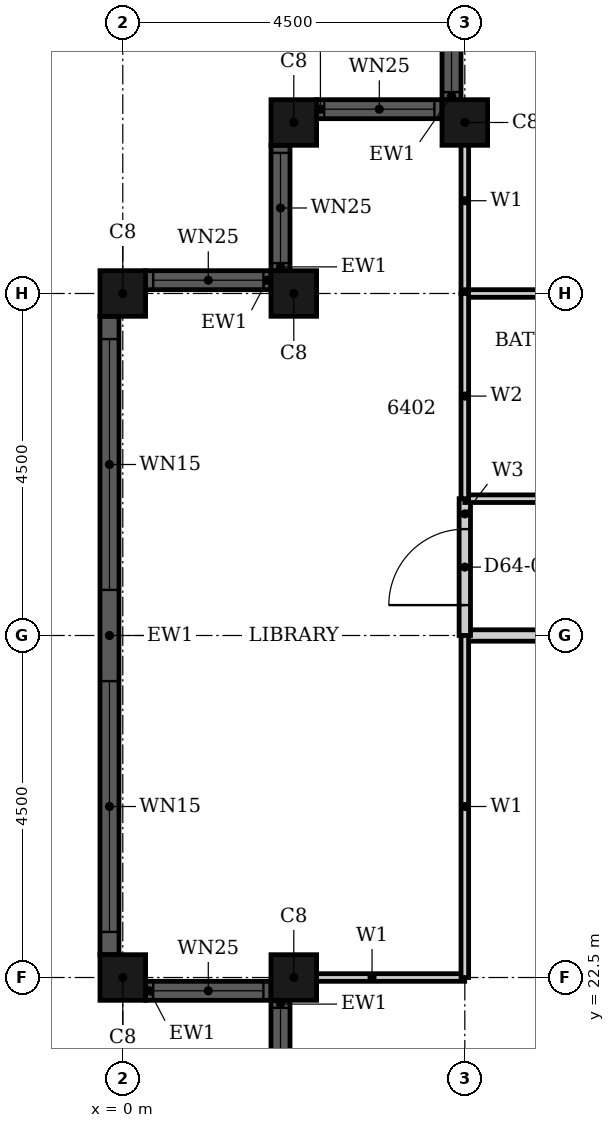
"""IFC4 building model, lengths in metres.
Left out: names, types, materials, properties, quantities, classifications, styles, units other than length and angle.
Written with IfcOpenShell. Run it as: python <this file> out.ifc"""

import sys

from ifc_helpers import new_model, si_unit, direction, frame, frame_2d, origin, origin_2d, place, context, subcontext, project, spatial, rectangle, hollow_rectangle, extrude, element, fill, save


model = new_model("IFC4")
c1 = context("Model", 3, precision=1e-05, world=origin(), true_north=direction((0.0, 1.0)))
c2 = subcontext(c1, "Body", "Model", "MODEL_VIEW")
j1 = project(units=[si_unit("LENGTHUNIT", "METRE"), si_unit("PLANEANGLEUNIT", "RADIAN")], contexts=[c1])
p1 = place(None, origin())
s1 = spatial("IfcSite", under=j1, at=p1, CompositionType="ELEMENT")
p2 = place(p1, origin())
s2 = spatial("IfcBuilding", under=s1, at=p2, CompositionType="ELEMENT")
p3 = place(p2, frame((0.0, 0.0, 252.7)))
s3 = spatial("IfcBuildingStorey", under=s2, at=p3, CompositionType="ELEMENT", Elevation=252.7)
for number, where, z_axis, x_axis in (
    (1, (4.5, 33.75, 0.0), (0.0, 0.0, 1.0), (1.0, 0.0, 0.0)),
    (2, (2.25, 33.75, 0.0), (0.0, 0.0, 1.0), (1.0, 0.0, 0.0)),
    (3, (2.25, 31.5, 0.0), (0.0, 0.0, 1.0), (1.0, 0.0, 0.0)),
    (4, (0.0, 31.5, 0.0), (0.0, 0.0, 1.0), (1.0, 0.0, 0.0)),
    (5, (0.0, 22.5, 0.0), (0.0, 0.0, 1.0), (1.0, 0.0, 0.0)),
    (6, (2.25, 22.5, 0.0), (0.0, 0.0, 1.0), (1.0, 0.0, 0.0)),
):
    element("IfcColumn", number, at=place(p3, frame(where, z_axis=z_axis, x_axis=x_axis)), inside=s3, PredefinedType="COLUMN", context=c2, shape_type="SweptSolid", body=[
        extrude(hollow_rectangle(XDim=0.6, YDim=0.6, WallThickness=0.02, at=origin_2d()), origin(), (0.0, 0.0, 1.0), 3.7),
    ])
p4 = place(p3, frame((4.325, 35.7, 0.0), z_axis=(0.0, 0.0, 1.0), x_axis=(0.0, -1.0, 0.0)))
e7 = element("IfcWall", 7, at=p4, inside=s3, PredefinedType="SOLIDWALL", context=c2, shape_type="SweptSolid", body=[
    extrude(rectangle(XDim=1.65, YDim=0.25, at=frame_2d((0.825, 0.0))), origin(), (0.0, 0.0, 1.0), 3.7),
])
p5 = place(p4, frame((0.1, 0.0, 0.9)))
e8 = element("IfcOpeningElement", 8, at=p5, cuts=e7, PredefinedType="OPENING", context=c2, shape_type="SweptSolid", body=[
    extrude(rectangle(XDim=1.45, YDim=1.85, at=frame_2d((0.725, 0.925))), frame((0.0, 0.135, 0.0), z_axis=(0.0, -1.0, 0.0), x_axis=(1.0, 0.0, 0.0)), (0.0, 0.0, 1.0), 0.27),
])
p6 = place(p3, frame((4.2, 33.925, 0.0), z_axis=(0.0, 0.0, 1.0), x_axis=(-1.0, 0.0, 0.0)))
e9 = element("IfcWall", 9, at=p6, inside=s3, PredefinedType="SOLIDWALL", context=c2, shape_type="SweptSolid", body=[
    extrude(rectangle(XDim=1.65, YDim=0.25, at=frame_2d((0.825, 0.0))), origin(), (0.0, 0.0, 1.0), 3.7),
])
p7 = place(p6, frame((0.1, 0.0, 0.9)))
e10 = element("IfcOpeningElement", 10, at=p7, cuts=e9, PredefinedType="OPENING", context=c2, shape_type="SweptSolid", body=[
    extrude(rectangle(XDim=1.45, YDim=1.85, at=frame_2d((0.725, 0.925))), frame((0.0, 0.135, 0.0), z_axis=(0.0, -1.0, 0.0), x_axis=(1.0, 0.0, 0.0)), (0.0, 0.0, 1.0), 0.27),
])
p8 = place(p3, frame((2.075, 33.45, 0.0), z_axis=(0.0, 0.0, 1.0), x_axis=(0.0, -1.0, 0.0)))
e11 = element("IfcWall", 11, at=p8, inside=s3, PredefinedType="SOLIDWALL", context=c2, shape_type="SweptSolid", body=[
    extrude(rectangle(XDim=1.65, YDim=0.25, at=frame_2d((0.825, 0.0))), origin(), (0.0, 0.0, 1.0), 3.7),
])
p9 = place(p8, frame((0.1, 0.0, 0.9)))
e12 = element("IfcOpeningElement", 12, at=p9, cuts=e11, PredefinedType="OPENING", context=c2, shape_type="SweptSolid", body=[
    extrude(rectangle(XDim=1.45, YDim=1.85, at=frame_2d((0.725, 0.925))), frame((0.0, 0.135, 0.0), z_axis=(0.0, -1.0, 0.0), x_axis=(1.0, 0.0, 0.0)), (0.0, 0.0, 1.0), 0.27),
])
p10 = place(p3, frame((1.95, 31.675, 0.0), z_axis=(0.0, 0.0, 1.0), x_axis=(-1.0, 0.0, 0.0)))
e13 = element("IfcWall", 13, at=p10, inside=s3, PredefinedType="SOLIDWALL", context=c2, shape_type="SweptSolid", body=[
    extrude(rectangle(XDim=1.65, YDim=0.25, at=frame_2d((0.825, 0.0))), origin(), (0.0, 0.0, 1.0), 3.7),
])
p11 = place(p10, frame((0.1, 0.0, 0.9)))
e14 = element("IfcOpeningElement", 14, at=p11, cuts=e13, PredefinedType="OPENING", context=c2, shape_type="SweptSolid", body=[
    extrude(rectangle(XDim=1.45, YDim=1.85, at=frame_2d((0.725, 0.925))), frame((0.0, 0.135, 0.0), z_axis=(0.0, -1.0, 0.0), x_axis=(1.0, 0.0, 0.0)), (0.0, 0.0, 1.0), 0.27),
])
p12 = place(p3, frame((-0.175, 31.2, 0.0), z_axis=(0.0, 0.0, 1.0), x_axis=(0.0, -1.0, 0.0)))
e15 = element("IfcWall", 15, at=p12, inside=s3, PredefinedType="SOLIDWALL", context=c2, shape_type="SweptSolid", body=[
    extrude(rectangle(XDim=8.4, YDim=0.25, at=frame_2d((4.2, 0.0))), origin(), (0.0, 0.0, 1.0), 3.7),
])
p13 = place(p12, frame((0.3, 0.0, 0.45)))
e16 = element("IfcOpeningElement", 16, at=p13, cuts=e15, PredefinedType="OPENING", context=c2, shape_type="SweptSolid", body=[
    extrude(rectangle(XDim=3.3, YDim=2.3, at=frame_2d((1.65, 1.15))), frame((0.0, 0.135, 0.0), z_axis=(0.0, -1.0, 0.0), x_axis=(1.0, 0.0, 0.0)), (0.0, 0.0, 1.0), 0.27),
])
p14 = place(p12, frame((4.8, 0.0, 0.45)))
e17 = element("IfcOpeningElement", 17, at=p14, cuts=e15, PredefinedType="OPENING", context=c2, shape_type="SweptSolid", body=[
    extrude(rectangle(XDim=3.3, YDim=2.3, at=frame_2d((1.65, 1.15))), frame((0.0, 0.135, 0.0), z_axis=(0.0, -1.0, 0.0), x_axis=(1.0, 0.0, 0.0)), (0.0, 0.0, 1.0), 0.27),
])
p15 = place(p3, frame((0.3, 22.325, 0.0), z_axis=(0.0, 0.0, 1.0), x_axis=(1.0, 0.0, 0.0)))
e18 = element("IfcWall", 18, at=p15, inside=s3, PredefinedType="SOLIDWALL", context=c2, shape_type="SweptSolid", body=[
    extrude(rectangle(XDim=1.65, YDim=0.25, at=frame_2d((0.825, 0.0))), origin(), (0.0, 0.0, 1.0), 3.7),
])
p16 = place(p15, frame((0.1, 0.0, 0.9)))
e19 = element("IfcOpeningElement", 19, at=p16, cuts=e18, PredefinedType="OPENING", context=c2, shape_type="SweptSolid", body=[
    extrude(rectangle(XDim=1.45, YDim=1.85, at=frame_2d((0.725, 0.925))), frame((0.0, 0.135, 0.0), z_axis=(0.0, -1.0, 0.0), x_axis=(1.0, 0.0, 0.0)), (0.0, 0.0, 1.0), 0.27),
])
p17 = place(p3, frame((2.075, 22.2, 0.0), z_axis=(0.0, 0.0, 1.0), x_axis=(0.0, -1.0, 0.0)))
e20 = element("IfcWall", 20, at=p17, inside=s3, PredefinedType="SOLIDWALL", context=c2, shape_type="SweptSolid", body=[
    extrude(rectangle(XDim=1.65, YDim=0.25, at=frame_2d((0.825, 0.0))), origin(), (0.0, 0.0, 1.0), 3.7),
])
p18 = place(p17, frame((0.1, 0.0, 0.9)))
e21 = element("IfcOpeningElement", 21, at=p18, cuts=e20, PredefinedType="OPENING", context=c2, shape_type="SweptSolid", body=[
    extrude(rectangle(XDim=1.45, YDim=1.85, at=frame_2d((0.725, 0.925))), frame((0.0, 0.135, 0.0), z_axis=(0.0, -1.0, 0.0), x_axis=(1.0, 0.0, 0.0)), (0.0, 0.0, 1.0), 0.27),
])
p19 = place(p3, frame((4.5, 27.0, 0.0), z_axis=(0.0, 0.0, 1.0), x_axis=(1.0, 0.0, 0.0)))
e22 = element("IfcWall", 22, at=p19, inside=s3, PredefinedType="PARTITIONING", context=c2, shape_type="SweptSolid", body=[
    extrude(rectangle(XDim=13.5, YDim=0.15, at=frame_2d((6.75, 0.0))), origin(), (0.0, 0.0, 1.0), 2.68),
])
p20 = place(p19, frame((5.35, 0.0, 0.0)))
e23 = element("IfcOpeningElement", 23, at=p20, cuts=e22, PredefinedType="OPENING", context=c2, shape_type="SweptSolid", body=[
    extrude(rectangle(XDim=1.0, YDim=2.1, at=frame_2d((0.5, 1.05))), frame((0.0, 0.085, 0.0), z_axis=(0.0, -1.0, 0.0), x_axis=(1.0, 0.0, 0.0)), (0.0, 0.0, 1.0), 0.17),
])
p21 = place(p3, frame((4.5, 27.0, 0.0), z_axis=(0.0, 0.0, 1.0), x_axis=(0.0, 1.0, 0.0)))
e24 = element("IfcWall", 24, at=p21, inside=s3, PredefinedType="PARTITIONING", context=c2, shape_type="SweptSolid", body=[
    extrude(rectangle(XDim=1.8, YDim=0.15, at=frame_2d((0.9, 0.0))), origin(), (0.0, 0.0, 1.0), 3.4),
])
p22 = place(p21, frame((0.4, 0.0, 0.0)))
e25 = element("IfcOpeningElement", 25, at=p22, cuts=e24, PredefinedType="OPENING", context=c2, shape_type="SweptSolid", body=[
    extrude(rectangle(XDim=1.0, YDim=2.1, at=frame_2d((0.5, 1.05))), frame((0.0, 0.085, 0.0), z_axis=(0.0, -1.0, 0.0), x_axis=(1.0, 0.0, 0.0)), (0.0, 0.0, 1.0), 0.17),
])
p23 = place(p3, frame((2.06, 22.5, 0.0), z_axis=(0.0, 0.0, 1.0), x_axis=(1.0, 0.0, 0.0)))
e26 = element("IfcWall", 26, at=p23, inside=s3, PredefinedType="PARTITIONING", context=c2, shape_type="SweptSolid", body=[
    extrude(rectangle(XDim=2.439, YDim=0.1, at=frame_2d((1.219, 0.0))), origin(), (0.0, 0.0, 1.0), 2.68),
])
p24 = place(p3, frame((4.5, 31.501, 0.0), z_axis=(0.0, 0.0, 1.0), x_axis=(0.0, 1.0, 0.0)))
e27 = element("IfcWall", 27, at=p24, inside=s3, PredefinedType="PARTITIONING", context=c2, shape_type="SweptSolid", body=[
    extrude(rectangle(XDim=2.439, YDim=0.1, at=frame_2d((1.219, 0.0))), origin(), (0.0, 0.0, 1.0), 3.4),
])
p25 = place(p3, frame((4.5, 22.5, 0.0), z_axis=(0.0, 0.0, 1.0), x_axis=(0.0, 1.0, 0.0)))
e28 = element("IfcWall", 28, at=p25, inside=s3, PredefinedType="PARTITIONING", context=c2, shape_type="SweptSolid", body=[
    extrude(rectangle(XDim=4.5, YDim=0.1, at=frame_2d((2.25, 0.0))), origin(), (0.0, 0.0, 1.0), 3.4),
])
p26 = place(p3, frame((4.5, 28.8, 0.0), z_axis=(0.0, 0.0, 1.0), x_axis=(1.0, 0.0, 0.0)))
e29 = element("IfcWall", 29, at=p26, inside=s3, PredefinedType="PARTITIONING", context=c2, shape_type="SweptSolid", body=[
    extrude(rectangle(XDim=2.4, YDim=0.1, at=frame_2d((1.2, 0.0))), origin(), (0.0, 0.0, 1.0), 3.4),
])
p27 = place(p3, frame((4.5, 31.5, 0.0), z_axis=(0.0, 0.0, 1.0), x_axis=(1.0, 0.0, 0.0)))
e30 = element("IfcWall", 30, at=p27, inside=s3, PredefinedType="PARTITIONING", context=c2, shape_type="SweptSolid", body=[
    extrude(rectangle(XDim=2.4, YDim=0.1, at=frame_2d((1.2, 0.0))), origin(), (0.0, 0.0, 1.0), 2.68),
])
p28 = place(p3, frame((4.5, 28.8, 0.0), z_axis=(0.0, 0.0, 1.0), x_axis=(0.0, 1.0, 0.0)))
e31 = element("IfcWall", 31, at=p28, inside=s3, PredefinedType="PARTITIONING", context=c2, shape_type="SweptSolid", body=[
    extrude(rectangle(XDim=2.7, YDim=0.1, at=frame_2d((1.35, 0.0))), origin(), (0.0, 0.0, 1.0), 3.4),
])
p29 = place(p5, origin())
e32 = element("IfcWindow", 32, at=p29, inside=s3, PartitioningType="SINGLE_PANEL", PredefinedType="WINDOW", context=c2, shape_type="SweptSolid", body=[
    extrude(rectangle(XDim=1.45, YDim=1.85, at=frame_2d((0.725, 0.925))), frame((0.0, 0.03, 0.0), z_axis=(0.0, -1.0, 0.0), x_axis=(1.0, 0.0, 0.0)), (0.0, 0.0, 1.0), 0.06),
])
fill(e8, e32)
p30 = place(p7, origin())
e33 = element("IfcWindow", 33, at=p30, inside=s3, PartitioningType="SINGLE_PANEL", PredefinedType="WINDOW", context=c2, shape_type="SweptSolid", body=[
    extrude(rectangle(XDim=1.45, YDim=1.85, at=frame_2d((0.725, 0.925))), frame((0.0, 0.03, 0.0), z_axis=(0.0, -1.0, 0.0), x_axis=(1.0, 0.0, 0.0)), (0.0, 0.0, 1.0), 0.06),
])
fill(e10, e33)
p31 = place(p9, origin())
e34 = element("IfcWindow", 34, at=p31, inside=s3, PartitioningType="SINGLE_PANEL", PredefinedType="WINDOW", context=c2, shape_type="SweptSolid", body=[
    extrude(rectangle(XDim=1.45, YDim=1.85, at=frame_2d((0.725, 0.925))), frame((0.0, 0.03, 0.0), z_axis=(0.0, -1.0, 0.0), x_axis=(1.0, 0.0, 0.0)), (0.0, 0.0, 1.0), 0.06),
])
fill(e12, e34)
p32 = place(p11, origin())
e35 = element("IfcWindow", 35, at=p32, inside=s3, PartitioningType="SINGLE_PANEL", PredefinedType="WINDOW", context=c2, shape_type="SweptSolid", body=[
    extrude(rectangle(XDim=1.45, YDim=1.85, at=frame_2d((0.725, 0.925))), frame((0.0, 0.03, 0.0), z_axis=(0.0, -1.0, 0.0), x_axis=(1.0, 0.0, 0.0)), (0.0, 0.0, 1.0), 0.06),
])
fill(e14, e35)
p33 = place(p13, origin())
e36 = element("IfcWindow", 36, at=p33, inside=s3, PartitioningType="SINGLE_PANEL", PredefinedType="WINDOW", context=c2, shape_type="SweptSolid", body=[
    extrude(rectangle(XDim=3.3, YDim=2.3, at=frame_2d((1.65, 1.15))), frame((0.0, 0.03, 0.0), z_axis=(0.0, -1.0, 0.0), x_axis=(1.0, 0.0, 0.0)), (0.0, 0.0, 1.0), 0.06),
])
fill(e16, e36)
p34 = place(p14, origin())
e37 = element("IfcWindow", 37, at=p34, inside=s3, PartitioningType="SINGLE_PANEL", PredefinedType="WINDOW", context=c2, shape_type="SweptSolid", body=[
    extrude(rectangle(XDim=3.3, YDim=2.3, at=frame_2d((1.65, 1.15))), frame((0.0, 0.03, 0.0), z_axis=(0.0, -1.0, 0.0), x_axis=(1.0, 0.0, 0.0)), (0.0, 0.0, 1.0), 0.06),
])
fill(e17, e37)
p35 = place(p16, origin())
e38 = element("IfcWindow", 38, at=p35, inside=s3, PartitioningType="SINGLE_PANEL", PredefinedType="WINDOW", context=c2, shape_type="SweptSolid", body=[
    extrude(rectangle(XDim=1.45, YDim=1.85, at=frame_2d((0.725, 0.925))), frame((0.0, 0.03, 0.0), z_axis=(0.0, -1.0, 0.0), x_axis=(1.0, 0.0, 0.0)), (0.0, 0.0, 1.0), 0.06),
])
fill(e19, e38)
p36 = place(p18, origin())
e39 = element("IfcWindow", 39, at=p36, inside=s3, PartitioningType="SINGLE_PANEL", PredefinedType="WINDOW", context=c2, shape_type="SweptSolid", body=[
    extrude(rectangle(XDim=1.45, YDim=1.85, at=frame_2d((0.725, 0.925))), frame((0.0, 0.03, 0.0), z_axis=(0.0, -1.0, 0.0), x_axis=(1.0, 0.0, 0.0)), (0.0, 0.0, 1.0), 0.06),
])
fill(e21, e39)
p37 = place(p22, origin())
e40 = element("IfcDoor", 40, at=p37, inside=s3, OperationType="SINGLE_SWING_RIGHT", PredefinedType="DOOR", context=c2, shape_type="SweptSolid", body=[
    extrude(rectangle(XDim=1.0, YDim=2.1, at=frame_2d((0.5, 1.05))), frame((0.0, 0.025, 0.0), z_axis=(0.0, -1.0, 0.0), x_axis=(1.0, 0.0, 0.0)), (0.0, 0.0, 1.0), 0.05),
])
fill(e25, e40)
save(model, sys.argv[1])
